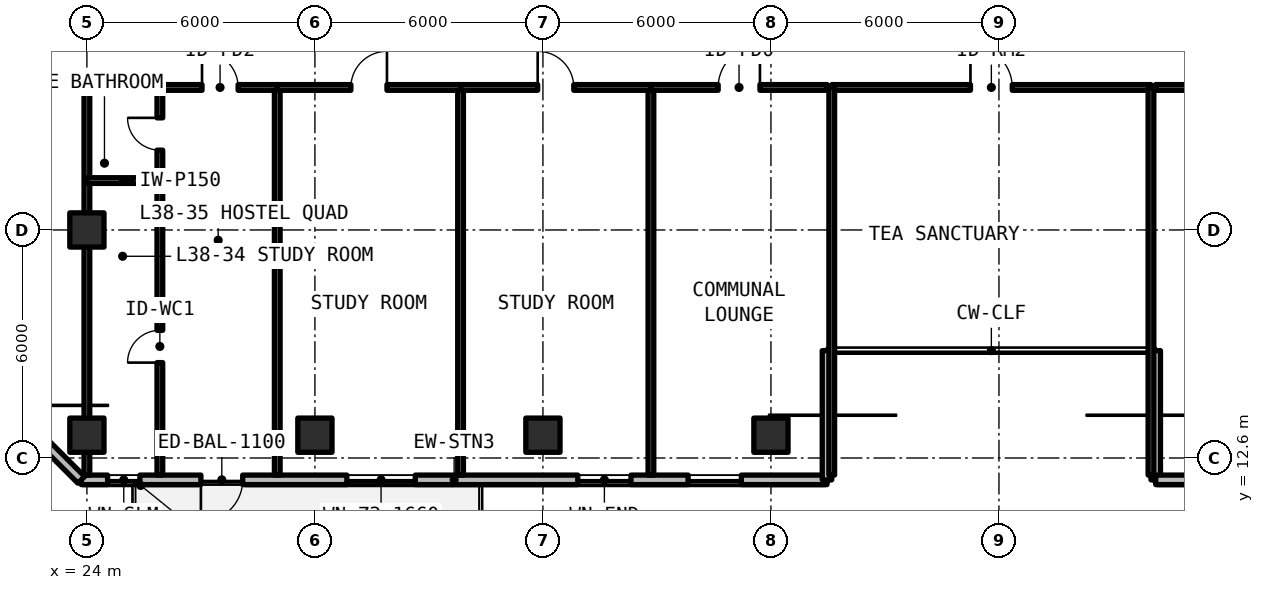
"""IFC4 building model, lengths in metres.
Left out: names, types, materials, properties, quantities, classifications, styles, units other than length and angle.
Written with IfcOpenShell. Run it as: python <this file> out.ifc"""

import sys

from ifc_helpers import new_model, si_unit, direction, frame, frame_2d, origin, origin_2d, place, context, subcontext, project, spatial, rectangle, extrude, element, fill, save


model = new_model("IFC4")
c1 = context("Model", 3, precision=1e-05, world=origin(), true_north=direction((0.0, 1.0)))
c2 = subcontext(c1, "Body", "Model", "MODEL_VIEW")
j1 = project(units=[si_unit("LENGTHUNIT", "METRE"), si_unit("PLANEANGLEUNIT", "RADIAN")], contexts=[c1])
p1 = place(None, origin())
s1 = spatial("IfcSite", under=j1, at=p1, CompositionType="ELEMENT")
p2 = place(p1, origin())
s2 = spatial("IfcBuilding", under=s1, at=p2, CompositionType="ELEMENT")
p3 = place(p2, frame((0.0, 0.0, 138.6)))
s3 = spatial("IfcBuildingStorey", under=s2, at=p3, CompositionType="ELEMENT", Elevation=138.6)
for number, where, z_axis, x_axis in (
    (1, (24.0, 18.6, 0.0), (0.0, 0.0, 1.0), (1.0, 0.0, 0.0)),
    (2, (24.0, 13.2, 0.0), (0.0, 0.0, 1.0), (1.0, 0.0, 0.0)),
    (3, (30.0, 13.2, 0.0), (0.0, 0.0, 1.0), (1.0, 0.0, 0.0)),
    (4, (36.0, 13.2, 0.0), (0.0, 0.0, 1.0), (1.0, 0.0, 0.0)),
    (5, (42.0, 13.2, 0.0), (0.0, 0.0, 1.0), (1.0, 0.0, 0.0)),
):
    element("IfcColumn", number, at=place(p3, frame(where, z_axis=z_axis, x_axis=x_axis)), inside=s3, PredefinedType="COLUMN", context=c2, shape_type="SweptSolid", body=[
        extrude(rectangle(XDim=0.9, YDim=0.9, at=origin_2d()), origin(), (0.0, 0.0, 1.0), 3.3),
    ])
p4 = place(p3, frame((23.852, 12.025, 0.0), z_axis=(0.0, 0.0, 1.0), x_axis=(1.0, 0.0, 0.0)))
e6 = element("IfcWall", 6, at=p4, inside=s3, PredefinedType="SOLIDWALL", context=c2, shape_type="SweptSolid", body=[
    extrude(rectangle(XDim=19.623, YDim=0.25, at=frame_2d((9.812, 0.0))), origin(), (0.0, 0.0, 1.0), 3.08),
])
p5 = place(p4, frame((3.148, 0.0, 0.0)))
e7 = element("IfcOpeningElement", 7, at=p5, cuts=e6, PredefinedType="OPENING", context=c2, shape_type="SweptSolid", body=[
    extrude(rectangle(XDim=1.1, YDim=2.15, at=frame_2d((0.55, 1.075))), frame((0.0, 0.135, 0.0), z_axis=(0.0, -1.0, 0.0), x_axis=(1.0, 0.0, 0.0)), (0.0, 0.0, 1.0), 0.27),
])
p6 = place(p4, frame((0.693, 0.0, 0.78)))
e8 = element("IfcOpeningElement", 8, at=p6, cuts=e6, PredefinedType="OPENING", context=c2, shape_type="SweptSolid", body=[
    extrude(rectangle(XDim=0.85, YDim=1.65, at=frame_2d((0.425, 0.825))), frame((0.0, 0.135, 0.0), z_axis=(0.0, -1.0, 0.0), x_axis=(1.0, 0.0, 0.0)), (0.0, 0.0, 1.0), 0.27),
])
p7 = place(p4, frame((6.989, 0.0, 0.78)))
e9 = element("IfcOpeningElement", 9, at=p7, cuts=e6, PredefinedType="OPENING", context=c2, shape_type="SweptSolid", body=[
    extrude(rectangle(XDim=1.8, YDim=1.66, at=frame_2d((0.9, 0.83))), frame((0.0, 0.135, 0.0), z_axis=(0.0, -1.0, 0.0), x_axis=(1.0, 0.0, 0.0)), (0.0, 0.0, 1.0), 0.27),
])
p8 = place(p4, frame((13.065, 0.0, 0.78)))
e10 = element("IfcOpeningElement", 10, at=p8, cuts=e6, PredefinedType="OPENING", context=c2, shape_type="SweptSolid", body=[
    extrude(rectangle(XDim=1.4, YDim=1.65, at=frame_2d((0.7, 0.825))), frame((0.0, 0.135, 0.0), z_axis=(0.0, -1.0, 0.0), x_axis=(1.0, 0.0, 0.0)), (0.0, 0.0, 1.0), 0.27),
])
p9 = place(p4, frame((15.969, 0.0, 0.78)))
e11 = element("IfcOpeningElement", 11, at=p9, cuts=e6, PredefinedType="OPENING", context=c2, shape_type="SweptSolid", body=[
    extrude(rectangle(XDim=1.4, YDim=1.65, at=frame_2d((0.7, 0.825))), frame((0.0, 0.135, 0.0), z_axis=(0.0, -1.0, 0.0), x_axis=(1.0, 0.0, 0.0)), (0.0, 0.0, 1.0), 0.27),
])
for number, where, z_axis, x_axis in (
    (12, (43.475, 12.025, 0.0), (0.0, 0.0, 1.0), (0.0, 1.0, 0.0)),
    (13, (52.125, 15.425, 0.0), (0.0, 0.0, 1.0), (0.0, -1.0, 0.0)),
):
    element("IfcWall", number, at=place(p3, frame(where, z_axis=z_axis, x_axis=x_axis)), inside=s3, PredefinedType="SOLIDWALL", context=c2, shape_type="SweptSolid", body=[
        extrude(rectangle(XDim=3.4, YDim=0.25, at=frame_2d((1.7, 0.0))), origin(), (0.0, 0.0, 1.0), 3.08),
    ])
p10 = place(p3, frame((52.125, 12.025, 0.0), z_axis=(0.0, 0.0, 1.0), x_axis=(1.0, 0.0, 0.0)))
e14 = element("IfcWall", 14, at=p10, inside=s3, PredefinedType="SOLIDWALL", context=c2, shape_type="SweptSolid", body=[
    extrude(rectangle(XDim=43.623, YDim=0.25, at=frame_2d((21.812, 0.0))), origin(), (0.0, 0.0, 1.0), 3.08),
])
p11 = place(p10, frame((10.925, 0.0, 0.0)))
e15 = element("IfcOpeningElement", 15, at=p11, cuts=e14, PredefinedType="OPENING", context=c2, shape_type="SweptSolid", body=[
    extrude(rectangle(XDim=1.1, YDim=2.15, at=frame_2d((0.55, 1.075))), frame((0.0, 0.135, 0.0), z_axis=(0.0, -1.0, 0.0), x_axis=(1.0, 0.0, 0.0)), (0.0, 0.0, 1.0), 0.27),
])
p12 = place(p10, frame((22.025, 0.0, 0.0)))
e16 = element("IfcOpeningElement", 16, at=p12, cuts=e14, PredefinedType="OPENING", context=c2, shape_type="SweptSolid", body=[
    extrude(rectangle(XDim=1.1, YDim=2.15, at=frame_2d((0.55, 1.075))), frame((0.0, 0.135, 0.0), z_axis=(0.0, -1.0, 0.0), x_axis=(1.0, 0.0, 0.0)), (0.0, 0.0, 1.0), 0.27),
])
p13 = place(p10, frame((2.738, 0.0, 0.78)))
e17 = element("IfcOpeningElement", 17, at=p13, cuts=e14, PredefinedType="OPENING", context=c2, shape_type="SweptSolid", body=[
    extrude(rectangle(XDim=1.8, YDim=1.66, at=frame_2d((0.9, 0.83))), frame((0.0, 0.135, 0.0), z_axis=(0.0, -1.0, 0.0), x_axis=(1.0, 0.0, 0.0)), (0.0, 0.0, 1.0), 0.27),
])
p14 = place(p10, frame((8.443, 0.0, 0.78)))
e18 = element("IfcOpeningElement", 18, at=p14, cuts=e14, PredefinedType="OPENING", context=c2, shape_type="SweptSolid", body=[
    extrude(rectangle(XDim=0.85, YDim=1.65, at=frame_2d((0.425, 0.825))), frame((0.0, 0.135, 0.0), z_axis=(0.0, -1.0, 0.0), x_axis=(1.0, 0.0, 0.0)), (0.0, 0.0, 1.0), 0.27),
])
p15 = place(p10, frame((14.879, 0.0, 0.78)))
e19 = element("IfcOpeningElement", 19, at=p15, cuts=e14, PredefinedType="OPENING", context=c2, shape_type="SweptSolid", body=[
    extrude(rectangle(XDim=0.85, YDim=1.65, at=frame_2d((0.425, 0.825))), frame((0.0, 0.135, 0.0), z_axis=(0.0, -1.0, 0.0), x_axis=(1.0, 0.0, 0.0)), (0.0, 0.0, 1.0), 0.27),
])
p16 = place(p10, frame((17.184, 0.0, 0.78)))
e20 = element("IfcOpeningElement", 20, at=p16, cuts=e14, PredefinedType="OPENING", context=c2, shape_type="SweptSolid", body=[
    extrude(rectangle(XDim=1.8, YDim=1.66, at=frame_2d((0.9, 0.83))), frame((0.0, 0.135, 0.0), z_axis=(0.0, -1.0, 0.0), x_axis=(1.0, 0.0, 0.0)), (0.0, 0.0, 1.0), 0.27),
])
p17 = place(p10, frame((26.643, 0.0, 0.78)))
e21 = element("IfcOpeningElement", 21, at=p17, cuts=e14, PredefinedType="OPENING", context=c2, shape_type="SweptSolid", body=[
    extrude(rectangle(XDim=1.4, YDim=1.65, at=frame_2d((0.7, 0.825))), frame((0.0, 0.135, 0.0), z_axis=(0.0, -1.0, 0.0), x_axis=(1.0, 0.0, 0.0)), (0.0, 0.0, 1.0), 0.27),
])
p18 = place(p10, frame((32.777, 0.0, 0.78)))
e22 = element("IfcOpeningElement", 22, at=p18, cuts=e14, PredefinedType="OPENING", context=c2, shape_type="SweptSolid", body=[
    extrude(rectangle(XDim=1.8, YDim=1.66, at=frame_2d((0.9, 0.83))), frame((0.0, 0.135, 0.0), z_axis=(0.0, -1.0, 0.0), x_axis=(1.0, 0.0, 0.0)), (0.0, 0.0, 1.0), 0.27),
])
p19 = place(p10, frame((38.836, 0.0, 0.78)))
e23 = element("IfcOpeningElement", 23, at=p19, cuts=e14, PredefinedType="OPENING", context=c2, shape_type="SweptSolid", body=[
    extrude(rectangle(XDim=1.8, YDim=1.66, at=frame_2d((0.9, 0.83))), frame((0.0, 0.135, 0.0), z_axis=(0.0, -1.0, 0.0), x_axis=(1.0, 0.0, 0.0)), (0.0, 0.0, 1.0), 0.27),
])
p20 = place(p3, frame((19.725, 16.152, 0.0), z_axis=(0.0, 0.0, 1.0), x_axis=(0.70708586489, -0.707127696864, 0.0)))
e24 = element("IfcWall", 24, at=p20, inside=s3, PredefinedType="SOLIDWALL", context=c2, shape_type="SweptSolid", body=[
    extrude(rectangle(XDim=5.836, YDim=0.25, at=frame_2d((2.918, 0.0))), origin(), (0.0, 0.0, 1.0), 3.08),
])
p21 = place(p20, frame((0.898, 0.0, 0.78)))
e25 = element("IfcOpeningElement", 25, at=p21, cuts=e24, PredefinedType="OPENING", context=c2, shape_type="SweptSolid", body=[
    extrude(rectangle(XDim=3.4, YDim=1.66, at=frame_2d((1.7, 0.83))), frame((0.0, 0.135, 0.0), z_axis=(0.0, -1.0, 0.0), x_axis=(1.0, 0.0, 0.0)), (0.0, 0.0, 1.0), 0.27),
])
p22 = place(p3, frame((43.6, 22.35, 0.0), z_axis=(0.0, 0.0, 1.0), x_axis=(1.0, 0.0, 0.0)))
e26 = element("IfcWall", 26, at=p22, inside=s3, PredefinedType="SOLIDWALL", context=c2, shape_type="SweptSolid", body=[
    extrude(rectangle(XDim=8.4, YDim=0.15, at=frame_2d((4.2, 0.0))), origin(), (0.0, 0.0, 1.0), 2.35),
])
p23 = place(p22, frame((3.65, 0.0, 0.0)))
e27 = element("IfcOpeningElement", 27, at=p23, cuts=e26, PredefinedType="OPENING", context=c2, shape_type="SweptSolid", body=[
    extrude(rectangle(XDim=1.1, YDim=2.15, at=frame_2d((0.55, 1.075))), frame((0.0, 0.085, 0.0), z_axis=(0.0, -1.0, 0.0), x_axis=(1.0, 0.0, 0.0)), (0.0, 0.0, 1.0), 0.17),
])
for number, where, z_axis, x_axis in (
    (28, (43.6, 12.15, 0.0), (0.0, 0.0, 1.0), (0.0, 1.0, 0.0)),
    (29, (52.0, 12.15, 0.0), (0.0, 0.0, 1.0), (0.0, 1.0, 0.0)),
    (30, (24.0, 12.15, 0.0), (0.0, 0.0, 1.0), (0.0, 1.0, 0.0)),
    (31, (29.009, 12.15, 0.0), (0.0, 0.0, 1.0), (0.0, 1.0, 0.0)),
):
    element("IfcWall", number, at=place(p3, frame(where, z_axis=z_axis, x_axis=x_axis)), inside=s3, PredefinedType="SOLIDWALL", context=c2, shape_type="SweptSolid", body=[
        extrude(rectangle(XDim=10.2, YDim=0.15, at=frame_2d((5.1, 0.0))), origin(), (0.0, 0.0, 1.0), 2.35),
    ])
p24 = place(p3, frame((24.0, 19.9, 0.0), z_axis=(0.0, 0.0, 1.0), x_axis=(1.0, 0.0, 0.0)))
e32 = element("IfcWall", 32, at=p24, inside=s3, PredefinedType="PARTITIONING", context=c2, shape_type="SweptSolid", body=[
    extrude(rectangle(XDim=1.92, YDim=0.15, at=frame_2d((0.96, 0.0))), origin(), (0.0, 0.0, 1.0), 2.35),
])
p25 = place(p3, frame((25.92, 12.15, 0.0), z_axis=(0.0, 0.0, 1.0), x_axis=(0.0, 1.0, 0.0)))
e33 = element("IfcWall", 33, at=p25, inside=s3, PredefinedType="PARTITIONING", context=c2, shape_type="SweptSolid", body=[
    extrude(rectangle(XDim=10.2, YDim=0.15, at=frame_2d((5.1, 0.0))), origin(), (0.0, 0.0, 1.0), 2.35),
])
p26 = place(p25, frame((2.96, 0.0, 0.0)))
e34 = element("IfcOpeningElement", 34, at=p26, cuts=e33, PredefinedType="OPENING", context=c2, shape_type="SweptSolid", body=[
    extrude(rectangle(XDim=0.85, YDim=2.1, at=frame_2d((0.425, 1.05))), frame((0.0, 0.085, 0.0), z_axis=(0.0, -1.0, 0.0), x_axis=(1.0, 0.0, 0.0)), (0.0, 0.0, 1.0), 0.17),
])
p27 = place(p25, frame((8.55, 0.0, 0.0)))
e35 = element("IfcOpeningElement", 35, at=p27, cuts=e33, PredefinedType="OPENING", context=c2, shape_type="SweptSolid", body=[
    extrude(rectangle(XDim=0.85, YDim=2.1, at=frame_2d((0.425, 1.05))), frame((0.0, 0.085, 0.0), z_axis=(0.0, -1.0, 0.0), x_axis=(1.0, 0.0, 0.0)), (0.0, 0.0, 1.0), 0.17),
])
p28 = place(p3, frame((24.0, 22.35, 0.0), z_axis=(0.0, 0.0, 1.0), x_axis=(1.0, 0.0, 0.0)))
e36 = element("IfcWall", 36, at=p28, inside=s3, PredefinedType="SOLIDWALL", context=c2, shape_type="SweptSolid", body=[
    extrude(rectangle(XDim=5.009, YDim=0.15, at=frame_2d((2.504, 0.0))), origin(), (0.0, 0.0, 1.0), 2.35),
])
p29 = place(p28, frame((3.03, 0.0, 0.0)))
e37 = element("IfcOpeningElement", 37, at=p29, cuts=e36, PredefinedType="OPENING", context=c2, shape_type="SweptSolid", body=[
    extrude(rectangle(XDim=0.95, YDim=2.15, at=frame_2d((0.475, 1.075))), frame((0.0, 0.085, 0.0), z_axis=(0.0, -1.0, 0.0), x_axis=(1.0, 0.0, 0.0)), (0.0, 0.0, 1.0), 0.17),
])
p30 = place(p3, frame((33.833, 12.15, 0.0), z_axis=(0.0, 0.0, 1.0), x_axis=(0.0, 1.0, 0.0)))
e38 = element("IfcWall", 38, at=p30, inside=s3, PredefinedType="SOLIDWALL", context=c2, shape_type="SweptSolid", body=[
    extrude(rectangle(XDim=10.2, YDim=0.15, at=frame_2d((5.1, 0.0))), origin(), (0.0, 0.0, 1.0), 2.35),
])
p31 = place(p3, frame((29.009, 22.35, 0.0), z_axis=(0.0, 0.0, 1.0), x_axis=(1.0, 0.0, 0.0)))
e39 = element("IfcWall", 39, at=p31, inside=s3, PredefinedType="SOLIDWALL", context=c2, shape_type="SweptSolid", body=[
    extrude(rectangle(XDim=4.824, YDim=0.15, at=frame_2d((2.412, 0.0))), origin(), (0.0, 0.0, 1.0), 2.35),
])
p32 = place(p31, frame((1.937, 0.0, 0.0)))
e40 = element("IfcOpeningElement", 40, at=p32, cuts=e39, PredefinedType="OPENING", context=c2, shape_type="SweptSolid", body=[
    extrude(rectangle(XDim=0.95, YDim=2.15, at=frame_2d((0.475, 1.075))), frame((0.0, 0.085, 0.0), z_axis=(0.0, -1.0, 0.0), x_axis=(1.0, 0.0, 0.0)), (0.0, 0.0, 1.0), 0.17),
])
p33 = place(p3, frame((38.842, 12.15, 0.0), z_axis=(0.0, 0.0, 1.0), x_axis=(0.0, 1.0, 0.0)))
e41 = element("IfcWall", 41, at=p33, inside=s3, PredefinedType="SOLIDWALL", context=c2, shape_type="SweptSolid", body=[
    extrude(rectangle(XDim=10.2, YDim=0.15, at=frame_2d((5.1, 0.0))), origin(), (0.0, 0.0, 1.0), 2.35),
])
p34 = place(p3, frame((33.833, 22.35, 0.0), z_axis=(0.0, 0.0, 1.0), x_axis=(1.0, 0.0, 0.0)))
e42 = element("IfcWall", 42, at=p34, inside=s3, PredefinedType="SOLIDWALL", context=c2, shape_type="SweptSolid", body=[
    extrude(rectangle(XDim=5.009, YDim=0.15, at=frame_2d((2.504, 0.0))), origin(), (0.0, 0.0, 1.0), 2.35),
])
p35 = place(p34, frame((2.03, 0.0, 0.0)))
e43 = element("IfcOpeningElement", 43, at=p35, cuts=e42, PredefinedType="OPENING", context=c2, shape_type="SweptSolid", body=[
    extrude(rectangle(XDim=0.95, YDim=2.15, at=frame_2d((0.475, 1.075))), frame((0.0, 0.085, 0.0), z_axis=(0.0, -1.0, 0.0), x_axis=(1.0, 0.0, 0.0)), (0.0, 0.0, 1.0), 0.17),
])
p36 = place(p3, frame((38.842, 22.35, 0.0), z_axis=(0.0, 0.0, 1.0), x_axis=(1.0, 0.0, 0.0)))
e44 = element("IfcWall", 44, at=p36, inside=s3, PredefinedType="SOLIDWALL", context=c2, shape_type="SweptSolid", body=[
    extrude(rectangle(XDim=4.638, YDim=0.15, at=frame_2d((2.319, 0.0))), origin(), (0.0, 0.0, 1.0), 2.35),
])
p37 = place(p36, frame((1.769, 0.0, 0.0)))
e45 = element("IfcOpeningElement", 45, at=p37, cuts=e44, PredefinedType="OPENING", context=c2, shape_type="SweptSolid", body=[
    extrude(rectangle(XDim=1.1, YDim=2.15, at=frame_2d((0.55, 1.075))), frame((0.0, 0.085, 0.0), z_axis=(0.0, -1.0, 0.0), x_axis=(1.0, 0.0, 0.0)), (0.0, 0.0, 1.0), 0.17),
])
p38 = place(p3, frame((52.12, 22.35, 0.0), z_axis=(0.0, 0.0, 1.0), x_axis=(1.0, 0.0, 0.0)))
e46 = element("IfcWall", 46, at=p38, inside=s3, PredefinedType="SOLIDWALL", context=c2, shape_type="SweptSolid", body=[
    extrude(rectangle(XDim=6.646, YDim=0.15, at=frame_2d((3.323, 0.0))), origin(), (0.0, 0.0, 1.0), 2.35),
])
p39 = place(p38, frame((2.848, 0.0, 0.0)))
e47 = element("IfcOpeningElement", 47, at=p39, cuts=e46, PredefinedType="OPENING", context=c2, shape_type="SweptSolid", body=[
    extrude(rectangle(XDim=0.95, YDim=2.15, at=frame_2d((0.475, 1.075))), frame((0.0, 0.085, 0.0), z_axis=(0.0, -1.0, 0.0), x_axis=(1.0, 0.0, 0.0)), (0.0, 0.0, 1.0), 0.17),
])
p40 = place(p5, frame((1.1, 0.0, 0.0), z_axis=(0.0, 0.0, 1.0), x_axis=(-1.0, 0.0, 0.0)))
e48 = element("IfcDoor", 48, at=p40, inside=s3, OperationType="SINGLE_SWING_RIGHT", PredefinedType="DOOR", context=c2, shape_type="SweptSolid", body=[
    extrude(rectangle(XDim=1.1, YDim=2.15, at=frame_2d((0.55, 1.075))), frame((0.0, 0.025, 0.0), z_axis=(0.0, -1.0, 0.0), x_axis=(1.0, 0.0, 0.0)), (0.0, 0.0, 1.0), 0.05),
])
fill(e7, e48)
p41 = place(p6, origin())
e49 = element("IfcWindow", 49, at=p41, inside=s3, PartitioningType="SINGLE_PANEL", PredefinedType="WINDOW", context=c2, shape_type="SweptSolid", body=[
    extrude(rectangle(XDim=0.85, YDim=1.65, at=frame_2d((0.425, 0.825))), frame((0.0, 0.03, 0.0), z_axis=(0.0, -1.0, 0.0), x_axis=(1.0, 0.0, 0.0)), (0.0, 0.0, 1.0), 0.06),
])
fill(e8, e49)
p42 = place(p7, origin())
e50 = element("IfcWindow", 50, at=p42, inside=s3, PartitioningType="SINGLE_PANEL", PredefinedType="WINDOW", context=c2, shape_type="SweptSolid", body=[
    extrude(rectangle(XDim=1.8, YDim=1.66, at=frame_2d((0.9, 0.83))), frame((0.0, 0.03, 0.0), z_axis=(0.0, -1.0, 0.0), x_axis=(1.0, 0.0, 0.0)), (0.0, 0.0, 1.0), 0.06),
])
fill(e9, e50)
p43 = place(p8, origin())
e51 = element("IfcWindow", 51, at=p43, inside=s3, PartitioningType="SINGLE_PANEL", PredefinedType="WINDOW", context=c2, shape_type="SweptSolid", body=[
    extrude(rectangle(XDim=1.4, YDim=1.65, at=frame_2d((0.7, 0.825))), frame((0.0, 0.03, 0.0), z_axis=(0.0, -1.0, 0.0), x_axis=(1.0, 0.0, 0.0)), (0.0, 0.0, 1.0), 0.06),
])
fill(e10, e51)
p44 = place(p9, origin())
e52 = element("IfcWindow", 52, at=p44, inside=s3, PartitioningType="SINGLE_PANEL", PredefinedType="WINDOW", context=c2, shape_type="SweptSolid", body=[
    extrude(rectangle(XDim=1.4, YDim=1.65, at=frame_2d((0.7, 0.825))), frame((0.0, 0.03, 0.0), z_axis=(0.0, -1.0, 0.0), x_axis=(1.0, 0.0, 0.0)), (0.0, 0.0, 1.0), 0.06),
])
fill(e11, e52)
p45 = place(p23, origin())
e53 = element("IfcDoor", 53, at=p45, inside=s3, OperationType="SINGLE_SWING_LEFT", PredefinedType="DOOR", context=c2, shape_type="SweptSolid", body=[
    extrude(rectangle(XDim=1.1, YDim=2.15, at=frame_2d((0.55, 1.075))), frame((0.0, 0.025, 0.0), z_axis=(0.0, -1.0, 0.0), x_axis=(1.0, 0.0, 0.0)), (0.0, 0.0, 1.0), 0.05),
])
fill(e27, e53)
p46 = place(p26, origin())
e54 = element("IfcDoor", 54, at=p46, inside=s3, OperationType="SINGLE_SWING_LEFT", PredefinedType="DOOR", context=c2, shape_type="SweptSolid", body=[
    extrude(rectangle(XDim=0.85, YDim=2.1, at=frame_2d((0.425, 1.05))), frame((0.0, 0.025, 0.0), z_axis=(0.0, -1.0, 0.0), x_axis=(1.0, 0.0, 0.0)), (0.0, 0.0, 1.0), 0.05),
])
fill(e34, e54)
p47 = place(p27, origin())
e55 = element("IfcDoor", 55, at=p47, inside=s3, OperationType="SINGLE_SWING_RIGHT", PredefinedType="DOOR", context=c2, shape_type="SweptSolid", body=[
    extrude(rectangle(XDim=0.85, YDim=2.1, at=frame_2d((0.425, 1.05))), frame((0.0, 0.025, 0.0), z_axis=(0.0, -1.0, 0.0), x_axis=(1.0, 0.0, 0.0)), (0.0, 0.0, 1.0), 0.05),
])
fill(e35, e55)
p48 = place(p29, origin())
e56 = element("IfcDoor", 56, at=p48, inside=s3, OperationType="SINGLE_SWING_LEFT", PredefinedType="DOOR", context=c2, shape_type="SweptSolid", body=[
    extrude(rectangle(XDim=0.95, YDim=2.15, at=frame_2d((0.475, 1.075))), frame((0.0, 0.025, 0.0), z_axis=(0.0, -1.0, 0.0), x_axis=(1.0, 0.0, 0.0)), (0.0, 0.0, 1.0), 0.05),
])
fill(e37, e56)
p49 = place(p32, origin())
e57 = element("IfcDoor", 57, at=p49, inside=s3, OperationType="SINGLE_SWING_RIGHT", PredefinedType="DOOR", context=c2, shape_type="SweptSolid", body=[
    extrude(rectangle(XDim=0.95, YDim=2.15, at=frame_2d((0.475, 1.075))), frame((0.0, 0.025, 0.0), z_axis=(0.0, -1.0, 0.0), x_axis=(1.0, 0.0, 0.0)), (0.0, 0.0, 1.0), 0.05),
])
fill(e40, e57)
p50 = place(p35, origin())
e58 = element("IfcDoor", 58, at=p50, inside=s3, OperationType="SINGLE_SWING_LEFT", PredefinedType="DOOR", context=c2, shape_type="SweptSolid", body=[
    extrude(rectangle(XDim=0.95, YDim=2.15, at=frame_2d((0.475, 1.075))), frame((0.0, 0.025, 0.0), z_axis=(0.0, -1.0, 0.0), x_axis=(1.0, 0.0, 0.0)), (0.0, 0.0, 1.0), 0.05),
])
fill(e43, e58)
p51 = place(p37, origin())
e59 = element("IfcDoor", 59, at=p51, inside=s3, OperationType="SINGLE_SWING_RIGHT", PredefinedType="DOOR", context=c2, shape_type="SweptSolid", body=[
    extrude(rectangle(XDim=1.1, YDim=2.15, at=frame_2d((0.55, 1.075))), frame((0.0, 0.025, 0.0), z_axis=(0.0, -1.0, 0.0), x_axis=(1.0, 0.0, 0.0)), (0.0, 0.0, 1.0), 0.05),
])
fill(e45, e59)
save(model, sys.argv[1])
